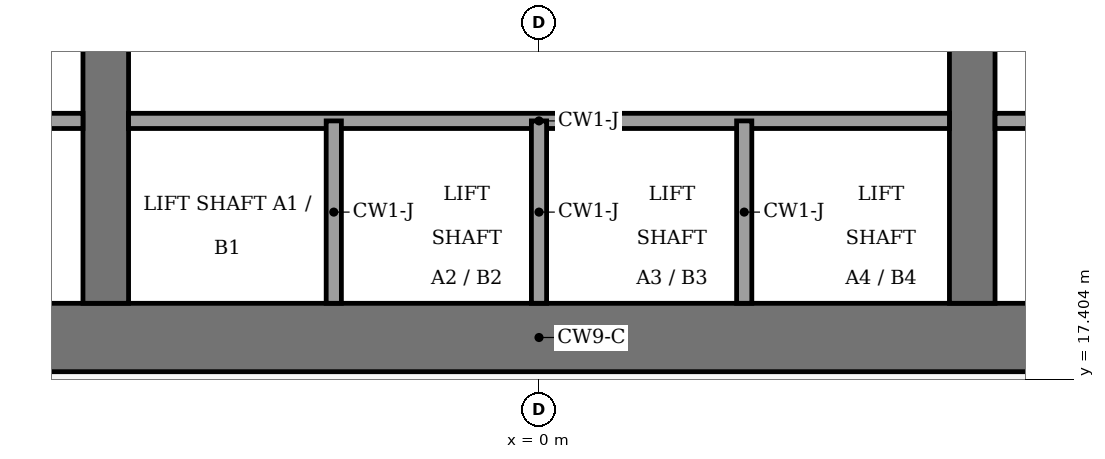
"""IFC4 building model, lengths in metres.
Left out: names, types, materials, properties, quantities, classifications, styles, units other than length and angle.
Written with IfcOpenShell. Run it as: python <this file> out.ifc"""

import sys

from ifc_helpers import new_model, si_unit, direction, frame, frame_2d, origin, place, context, subcontext, project, spatial, rectangle, extrude, element, save


model = new_model("IFC4")
c1 = context("Model", 3, precision=1e-05, world=origin(), true_north=direction((0.0, 1.0)))
c2 = subcontext(c1, "Body", "Model", "MODEL_VIEW")
j1 = project(units=[si_unit("LENGTHUNIT", "METRE"), si_unit("PLANEANGLEUNIT", "RADIAN")], contexts=[c1])
p1 = place(None, origin())
s1 = spatial("IfcSite", under=j1, at=p1, CompositionType="ELEMENT")
p2 = place(p1, origin())
s2 = spatial("IfcBuilding", under=s1, at=p2, CompositionType="ELEMENT")
p3 = place(p2, frame((0.0, 0.0, 226.0)))
s3 = spatial("IfcBuildingStorey", under=s2, at=p3, CompositionType="ELEMENT", Elevation=226.0)
p4 = place(p3, frame((-13.5, 17.95, -0.25), z_axis=(0.0, 0.0, 1.0), x_axis=(1.0, 0.0, 0.0)))
e1 = element("IfcWall", 1, at=p4, inside=s3, PredefinedType="SHEAR", context=c2, shape_type="SweptSolid", body=[
    extrude(rectangle(XDim=27.0, YDim=0.9, at=frame_2d((13.5, 0.0))), origin(), (0.0, 0.0, 1.0), 7.12),
])
p5 = place(p3, frame((-5.7, 18.4, -0.25), z_axis=(0.0, 0.0, 1.0), x_axis=(0.0, 1.0, 0.0)))
e2 = element("IfcWall", 2, at=p5, inside=s3, PredefinedType="SHEAR", context=c2, shape_type="SweptSolid", body=[
    extrude(rectangle(XDim=19.2, YDim=0.6, at=frame_2d((9.6, 0.0))), origin(), (0.0, 0.0, 1.0), 7.12),
])
p6 = place(p5, frame((8.35, 0.0, 0.25)))
e3 = element("IfcOpeningElement", 3, at=p6, cuts=e2, PredefinedType="OPENING", context=c2, shape_type="SweptSolid", body=[
    extrude(rectangle(XDim=0.9, YDim=2.1, at=frame_2d((0.45, 1.05))), frame((0.0, 0.31, 0.0), z_axis=(0.0, -1.0, 0.0), x_axis=(1.0, 0.0, 0.0)), (0.0, 0.0, 1.0), 0.62),
])
p7 = place(p3, frame((5.7, 18.4, -0.25), z_axis=(0.0, 0.0, 1.0), x_axis=(0.0, 1.0, 0.0)))
e4 = element("IfcWall", 4, at=p7, inside=s3, PredefinedType="SHEAR", context=c2, shape_type="SweptSolid", body=[
    extrude(rectangle(XDim=19.2, YDim=0.6, at=frame_2d((9.6, 0.0))), origin(), (0.0, 0.0, 1.0), 7.12),
])
p8 = place(p7, frame((13.3, 0.0, 0.25)))
e5 = element("IfcOpeningElement", 5, at=p8, cuts=e4, PredefinedType="OPENING", context=c2, shape_type="SweptSolid", body=[
    extrude(rectangle(XDim=2.4, YDim=2.4, at=frame_2d((1.2, 1.2))), frame((0.0, 0.31, 0.0), z_axis=(0.0, -1.0, 0.0), x_axis=(1.0, 0.0, 0.0)), (0.0, 0.0, 1.0), 0.62),
])
p9 = place(p3, frame((-12.6, 20.8, 0.0), z_axis=(0.0, 0.0, 1.0), x_axis=(1.0, 0.0, 0.0)))
e6 = element("IfcWall", 6, at=p9, inside=s3, PredefinedType="PARTITIONING", context=c2, shape_type="SweptSolid", body=[
    extrude(rectangle(XDim=6.6, YDim=0.2, at=frame_2d((3.3, 0.0))), origin(), (0.0, 0.0, 1.0), 6.87),
])
p10 = place(p9, frame((2.8, 0.0, 0.0)))
e7 = element("IfcOpeningElement", 7, at=p10, cuts=e6, PredefinedType="OPENING", context=c2, shape_type="SweptSolid", body=[
    extrude(rectangle(XDim=1.0, YDim=2.1, at=frame_2d((0.5, 1.05))), frame((0.0, 0.11, 0.0), z_axis=(0.0, -1.0, 0.0), x_axis=(1.0, 0.0, 0.0)), (0.0, 0.0, 1.0), 0.22),
])
p11 = place(p3, frame((-5.4, 20.8, 0.0), z_axis=(0.0, 0.0, 1.0), x_axis=(1.0, 0.0, 0.0)))
e8 = element("IfcWall", 8, at=p11, inside=s3, PredefinedType="PARTITIONING", context=c2, shape_type="SweptSolid", body=[
    extrude(rectangle(XDim=10.8, YDim=0.2, at=frame_2d((5.4, 0.0))), origin(), (0.0, 0.0, 1.0), 6.87),
])
p12 = place(p3, frame((6.0, 20.8, 0.0), z_axis=(0.0, 0.0, 1.0), x_axis=(1.0, 0.0, 0.0)))
e9 = element("IfcWall", 9, at=p12, inside=s3, PredefinedType="PARTITIONING", context=c2, shape_type="SweptSolid", body=[
    extrude(rectangle(XDim=6.6, YDim=0.2, at=frame_2d((3.3, 0.0))), origin(), (0.0, 0.0, 1.0), 6.87),
])
p13 = place(p12, frame((2.8, 0.0, 0.0)))
e10 = element("IfcOpeningElement", 10, at=p13, cuts=e9, PredefinedType="OPENING", context=c2, shape_type="SweptSolid", body=[
    extrude(rectangle(XDim=1.0, YDim=2.1, at=frame_2d((0.5, 1.05))), frame((0.0, 0.11, 0.0), z_axis=(0.0, -1.0, 0.0), x_axis=(1.0, 0.0, 0.0)), (0.0, 0.0, 1.0), 0.22),
])
for number, where, z_axis, x_axis in (
    (11, (-2.7, 18.4, 0.0), (0.0, 0.0, 1.0), (0.0, 1.0, 0.0)),
    (12, (0.0, 18.4, 0.0), (0.0, 0.0, 1.0), (0.0, 1.0, 0.0)),
    (13, (2.7, 18.4, 0.0), (0.0, 0.0, 1.0), (0.0, 1.0, 0.0)),
):
    element("IfcWall", number, at=place(p3, frame(where, z_axis=z_axis, x_axis=x_axis)), inside=s3, PredefinedType="PARTITIONING", context=c2, shape_type="SweptSolid", body=[
        extrude(rectangle(XDim=2.4, YDim=0.2, at=frame_2d((1.2, 0.0))), origin(), (0.0, 0.0, 1.0), 6.87),
    ])
save(model, sys.argv[1])
